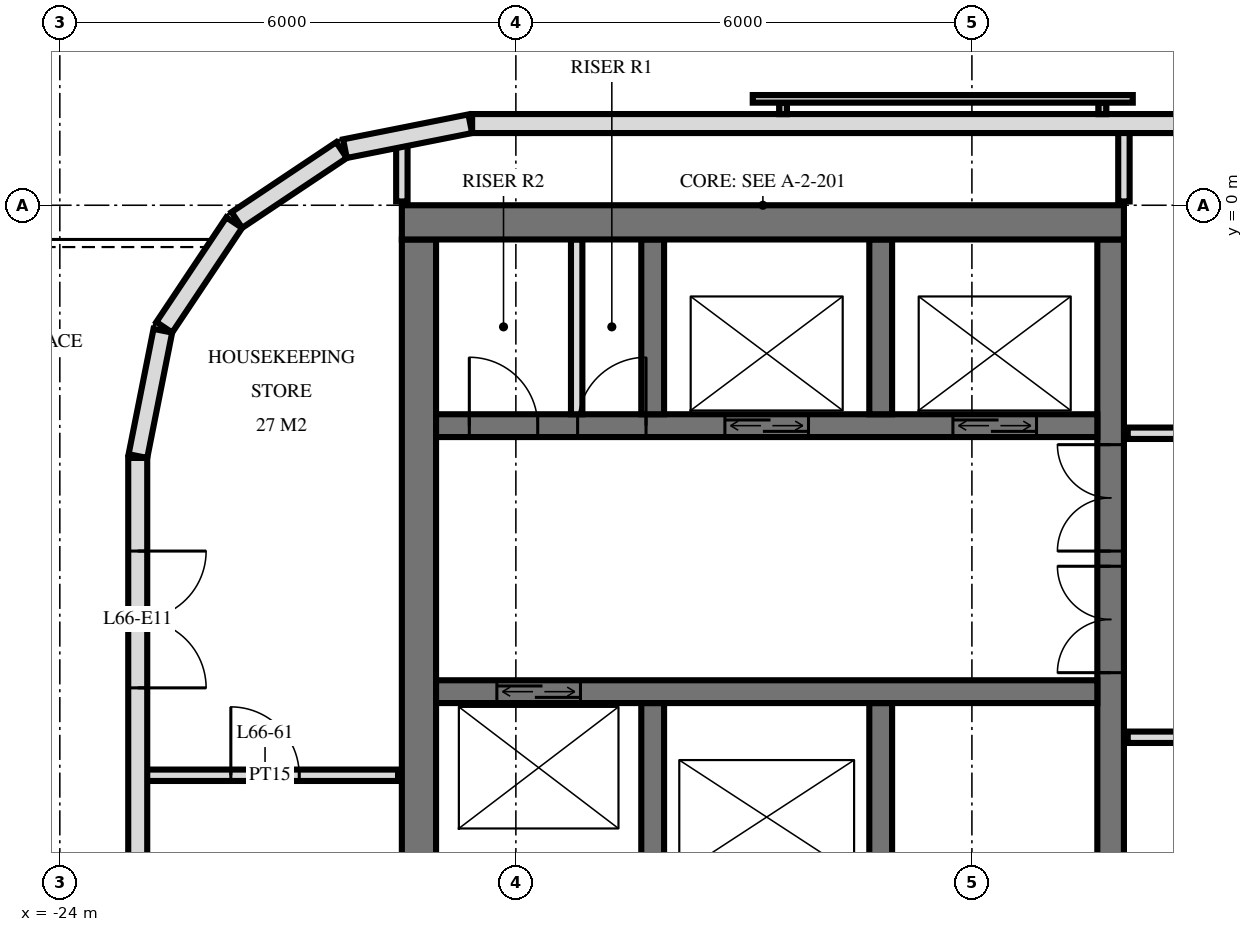
"""IFC4 building model, lengths in metres.
Left out: names, types, materials, properties, quantities, classifications, styles, units other than length and angle.
Written with IfcOpenShell. Run it as: python <this file> out.ifc"""

import sys

from ifc_helpers import new_model, si_unit, direction, frame, frame_2d, origin, place, context, subcontext, project, spatial, rectangle, extrude, element, fill, save


model = new_model("IFC4")
c1 = context("Model", 3, precision=1e-05, world=origin(), true_north=direction((0.0, 1.0)))
c2 = subcontext(c1, "Body", "Model", "MODEL_VIEW")
j1 = project(units=[si_unit("LENGTHUNIT", "METRE"), si_unit("PLANEANGLEUNIT", "RADIAN")], contexts=[c1])
p1 = place(None, origin())
s1 = spatial("IfcSite", under=j1, at=p1, CompositionType="ELEMENT")
p2 = place(p1, origin())
s2 = spatial("IfcBuilding", under=s1, at=p2, CompositionType="ELEMENT")
p3 = place(p2, frame((0.0, 0.0, 252.6)))
s3 = spatial("IfcBuildingStorey", under=s2, at=p3, CompositionType="ELEMENT", Elevation=252.6)
p4 = place(p3, frame((-19.5, -0.225, 0.0), z_axis=(0.0, 0.0, 1.0), x_axis=(1.0, 0.0, 0.0)))
e1 = element("IfcWall", 1, at=p4, inside=s3, PredefinedType="SHEAR", context=c2, shape_type="SweptSolid", body=[
    extrude(rectangle(XDim=9.5, YDim=0.45, at=frame_2d((4.75, 0.0))), origin(), (0.0, 0.0, 1.0), 3.5),
])
p5 = place(p3, frame((-10.175, -14.55, 0.0), z_axis=(0.0, 0.0, 1.0), x_axis=(0.0, 1.0, 0.0)))
e2 = element("IfcWall", 2, at=p5, inside=s3, PredefinedType="SHEAR", context=c2, shape_type="SweptSolid", body=[
    extrude(rectangle(XDim=14.1, YDim=0.35, at=frame_2d((7.05, 0.0))), origin(), (0.0, 0.0, 1.0), 3.5),
])
p6 = place(p5, frame((8.4, 0.0, 0.0)))
e3 = element("IfcOpeningElement", 3, at=p6, cuts=e2, PredefinedType="OPENING", context=c2, shape_type="SweptSolid", body=[
    extrude(rectangle(XDim=1.4, YDim=2.4, at=frame_2d((0.7, 1.2))), frame((0.0, 0.185, 0.0), z_axis=(0.0, -1.0, 0.0), x_axis=(1.0, 0.0, 0.0)), (0.0, 0.0, 1.0), 0.37),
])
p7 = place(p5, frame((10.0, 0.0, 0.0)))
e4 = element("IfcOpeningElement", 4, at=p7, cuts=e2, PredefinedType="OPENING", context=c2, shape_type="SweptSolid", body=[
    extrude(rectangle(XDim=1.4, YDim=2.4, at=frame_2d((0.7, 1.2))), frame((0.0, 0.185, 0.0), z_axis=(0.0, -1.0, 0.0), x_axis=(1.0, 0.0, 0.0)), (0.0, 0.0, 1.0), 0.37),
])
p8 = place(p5, frame((4.0, 0.0, 0.0)))
e5 = element("IfcOpeningElement", 5, at=p8, cuts=e2, PredefinedType="OPENING", context=c2, shape_type="SweptSolid", body=[
    extrude(rectangle(XDim=1.2, YDim=2.1, at=frame_2d((0.6, 1.05))), frame((0.0, 0.185, 0.0), z_axis=(0.0, -1.0, 0.0), x_axis=(1.0, 0.0, 0.0)), (0.0, 0.0, 1.0), 0.37),
])
p9 = place(p3, frame((-19.275, -14.55, 0.0), z_axis=(0.0, 0.0, 1.0), x_axis=(0.0, 1.0, 0.0)))
e6 = element("IfcWall", 6, at=p9, inside=s3, PredefinedType="SHEAR", context=c2, shape_type="SweptSolid", body=[
    extrude(rectangle(XDim=14.1, YDim=0.45, at=frame_2d((7.05, 0.0))), origin(), (0.0, 0.0, 1.0), 3.5),
])
p10 = place(p3, frame((-19.05, -2.9, 0.0), z_axis=(0.0, 0.0, 1.0), x_axis=(1.0, 0.0, 0.0)))
e7 = element("IfcWall", 7, at=p10, inside=s3, PredefinedType="SHEAR", context=c2, shape_type="SweptSolid", body=[
    extrude(rectangle(XDim=8.7, YDim=0.3, at=frame_2d((4.35, 0.0))), origin(), (0.0, 0.0, 1.0), 3.5),
])
p11 = place(p10, frame((6.8, 0.0, 0.0)))
e8 = element("IfcOpeningElement", 8, at=p11, cuts=e7, PredefinedType="OPENING", context=c2, shape_type="SweptSolid", body=[
    extrude(rectangle(XDim=1.1, YDim=2.1, at=frame_2d((0.55, 1.05))), frame((0.0, 0.16, 0.0), z_axis=(0.0, -1.0, 0.0), x_axis=(1.0, 0.0, 0.0)), (0.0, 0.0, 1.0), 0.32),
])
p12 = place(p10, frame((3.8, 0.0, 0.0)))
e9 = element("IfcOpeningElement", 9, at=p12, cuts=e7, PredefinedType="OPENING", context=c2, shape_type="SweptSolid", body=[
    extrude(rectangle(XDim=1.1, YDim=2.1, at=frame_2d((0.55, 1.05))), frame((0.0, 0.16, 0.0), z_axis=(0.0, -1.0, 0.0), x_axis=(1.0, 0.0, 0.0)), (0.0, 0.0, 1.0), 0.32),
])
p13 = place(p10, frame((1.863, 0.0, 0.0)))
e10 = element("IfcOpeningElement", 10, at=p13, cuts=e7, PredefinedType="OPENING", context=c2, shape_type="SweptSolid", body=[
    extrude(rectangle(XDim=0.9, YDim=2.1, at=frame_2d((0.45, 1.05))), frame((0.0, 0.16, 0.0), z_axis=(0.0, -1.0, 0.0), x_axis=(1.0, 0.0, 0.0)), (0.0, 0.0, 1.0), 0.32),
])
p14 = place(p10, frame((0.438, 0.0, 0.0)))
e11 = element("IfcOpeningElement", 11, at=p14, cuts=e7, PredefinedType="OPENING", context=c2, shape_type="SweptSolid", body=[
    extrude(rectangle(XDim=0.9, YDim=2.1, at=frame_2d((0.45, 1.05))), frame((0.0, 0.16, 0.0), z_axis=(0.0, -1.0, 0.0), x_axis=(1.0, 0.0, 0.0)), (0.0, 0.0, 1.0), 0.32),
])
p15 = place(p3, frame((-19.05, -6.4, 0.0), z_axis=(0.0, 0.0, 1.0), x_axis=(1.0, 0.0, 0.0)))
e12 = element("IfcWall", 12, at=p15, inside=s3, PredefinedType="SHEAR", context=c2, shape_type="SweptSolid", body=[
    extrude(rectangle(XDim=8.7, YDim=0.3, at=frame_2d((4.35, 0.0))), origin(), (0.0, 0.0, 1.0), 3.5),
])
p16 = place(p15, frame((0.8, 0.0, 0.0)))
e13 = element("IfcOpeningElement", 13, at=p16, cuts=e12, PredefinedType="OPENING", context=c2, shape_type="SweptSolid", body=[
    extrude(rectangle(XDim=1.1, YDim=2.1, at=frame_2d((0.55, 1.05))), frame((0.0, 0.16, 0.0), z_axis=(0.0, -1.0, 0.0), x_axis=(1.0, 0.0, 0.0)), (0.0, 0.0, 1.0), 0.32),
])
for number, where, z_axis, x_axis in (
    (14, (-13.2, -2.75, 0.0), (0.0, 0.0, 1.0), (0.0, 1.0, 0.0)),
    (15, (-13.2, -8.85, 0.0), (0.0, 0.0, 1.0), (0.0, 1.0, 0.0)),
    (16, (-16.2, -2.75, 0.0), (0.0, 0.0, 1.0), (0.0, 1.0, 0.0)),
    (17, (-16.2, -8.85, 0.0), (0.0, 0.0, 1.0), (0.0, 1.0, 0.0)),
):
    element("IfcWall", number, at=place(p3, frame(where, z_axis=z_axis, x_axis=x_axis)), inside=s3, PredefinedType="SHEAR", context=c2, shape_type="SweptSolid", body=[
        extrude(rectangle(XDim=2.3, YDim=0.3, at=frame_2d((1.15, 0.0))), origin(), (0.0, 0.0, 1.0), 3.5),
    ])
p17 = place(p3, frame((18.575, 1.075, 0.0), z_axis=(0.0, 0.0, 1.0), x_axis=(-1.0, 0.0, 0.0)))
e18 = element("IfcWall", 18, at=p17, inside=s3, PredefinedType="SOLIDWALL", context=c2, shape_type="SweptSolid", body=[
    extrude(rectangle(XDim=37.151, YDim=0.25, at=frame_2d((18.575, 0.0))), origin(), (0.0, 0.0, 1.0), 3.22),
])
p18 = place(p17, frame((9.275, 0.0, 0.9)))
e19 = element("IfcOpeningElement", 19, at=p18, cuts=e18, PredefinedType="OPENING", context=c2, shape_type="SweptSolid", body=[
    extrude(rectangle(XDim=2.4, YDim=1.5, at=frame_2d((1.2, 0.75))), frame((0.0, 0.135, 0.0), z_axis=(0.0, -1.0, 0.0), x_axis=(1.0, 0.0, 0.0)), (0.0, 0.0, 1.0), 0.27),
])
p19 = place(p17, frame((12.275, 0.0, 0.9)))
e20 = element("IfcOpeningElement", 20, at=p19, cuts=e18, PredefinedType="OPENING", context=c2, shape_type="SweptSolid", body=[
    extrude(rectangle(XDim=2.4, YDim=1.5, at=frame_2d((1.2, 0.75))), frame((0.0, 0.135, 0.0), z_axis=(0.0, -1.0, 0.0), x_axis=(1.0, 0.0, 0.0)), (0.0, 0.0, 1.0), 0.27),
])
p20 = place(p17, frame((18.275, 0.0, 0.9)))
e21 = element("IfcOpeningElement", 21, at=p20, cuts=e18, PredefinedType="OPENING", context=c2, shape_type="SweptSolid", body=[
    extrude(rectangle(XDim=2.4, YDim=1.5, at=frame_2d((1.2, 0.75))), frame((0.0, 0.135, 0.0), z_axis=(0.0, -1.0, 0.0), x_axis=(1.0, 0.0, 0.0)), (0.0, 0.0, 1.0), 0.27),
])
p21 = place(p3, frame((-18.6, 1.073, 0.0), z_axis=(0.0, 0.0, 1.0), x_axis=(-0.980797896849, -0.195026884138, 0.0)))
e22 = element("IfcWall", 22, at=p21, inside=s3, PredefinedType="SOLIDWALL", context=c2, shape_type="SweptSolid", body=[
    extrude(rectangle(XDim=1.681, YDim=0.25, at=frame_2d((0.841, 0.0))), origin(), (0.0, 0.0, 1.0), 3.22),
])
for number, where, z_axis, x_axis in (
    (23, (-20.294, 0.726, 0.0), (0.0, 0.0, 1.0), (-0.831, -0.556, 0.0)),
    (24, (-21.706, -0.229, 0.0), (0.0, 0.0, 1.0), (-0.556, -0.831, 0.0)),
):
    element("IfcWall", number, at=place(p3, frame(where, z_axis=z_axis, x_axis=x_axis)), inside=s3, PredefinedType="SOLIDWALL", context=c2, shape_type="SweptSolid", body=[
        extrude(rectangle(XDim=1.656, YDim=0.25, at=frame_2d((0.828, 0.0))), origin(), (0.0, 0.0, 1.0), 3.22),
    ])
p22 = place(p3, frame((-22.645, -1.651, 0.0), z_axis=(0.0, 0.0, 1.0), x_axis=(-0.19513878023, -0.980775640221, 0.0)))
e25 = element("IfcWall", 25, at=p22, inside=s3, PredefinedType="SOLIDWALL", context=c2, shape_type="SweptSolid", body=[
    extrude(rectangle(XDim=1.681, YDim=0.25, at=frame_2d((0.841, 0.0))), origin(), (0.0, 0.0, 1.0), 3.22),
])
p23 = place(p3, frame((-22.975, -3.325, 0.0), z_axis=(0.0, 0.0, 1.0), x_axis=(0.0, -1.0, 0.0)))
e26 = element("IfcWall", 26, at=p23, inside=s3, PredefinedType="SOLIDWALL", context=c2, shape_type="SweptSolid", body=[
    extrude(rectangle(XDim=25.951, YDim=0.25, at=frame_2d((12.975, 0.0))), origin(), (0.0, 0.0, 1.0), 3.22),
])
p24 = place(p23, frame((1.225, 0.0, 0.0)))
e27 = element("IfcOpeningElement", 27, at=p24, cuts=e26, PredefinedType="OPENING", context=c2, shape_type="SweptSolid", body=[
    extrude(rectangle(XDim=1.8, YDim=2.4, at=frame_2d((0.9, 1.2))), frame((0.0, 0.135, 0.0), z_axis=(0.0, -1.0, 0.0), x_axis=(1.0, 0.0, 0.0)), (0.0, 0.0, 1.0), 0.27),
])
p25 = place(p23, frame((7.975, 0.0, 0.0)))
e28 = element("IfcOpeningElement", 28, at=p25, cuts=e26, PredefinedType="OPENING", context=c2, shape_type="SweptSolid", body=[
    extrude(rectangle(XDim=1.8, YDim=2.4, at=frame_2d((0.9, 1.2))), frame((0.0, 0.135, 0.0), z_axis=(0.0, -1.0, 0.0), x_axis=(1.0, 0.0, 0.0)), (0.0, 0.0, 1.0), 0.27),
])
p26 = place(p23, frame((18.175, 0.0, 0.0)))
e29 = element("IfcOpeningElement", 29, at=p26, cuts=e26, PredefinedType="OPENING", context=c2, shape_type="SweptSolid", body=[
    extrude(rectangle(XDim=1.8, YDim=2.4, at=frame_2d((0.9, 1.2))), frame((0.0, 0.135, 0.0), z_axis=(0.0, -1.0, 0.0), x_axis=(1.0, 0.0, 0.0)), (0.0, 0.0, 1.0), 0.27),
])
p27 = place(p23, frame((21.075, 0.0, 0.0)))
e30 = element("IfcOpeningElement", 30, at=p27, cuts=e26, PredefinedType="OPENING", context=c2, shape_type="SweptSolid", body=[
    extrude(rectangle(XDim=1.8, YDim=2.4, at=frame_2d((0.9, 1.2))), frame((0.0, 0.135, 0.0), z_axis=(0.0, -1.0, 0.0), x_axis=(1.0, 0.0, 0.0)), (0.0, 0.0, 1.0), 0.27),
])
p28 = place(p23, frame((23.825, 0.0, 0.9)))
e31 = element("IfcOpeningElement", 31, at=p28, cuts=e26, PredefinedType="OPENING", context=c2, shape_type="SweptSolid", body=[
    extrude(rectangle(XDim=1.8, YDim=1.5, at=frame_2d((0.9, 0.75))), frame((0.0, 0.135, 0.0), z_axis=(0.0, -1.0, 0.0), x_axis=(1.0, 0.0, 0.0)), (0.0, 0.0, 1.0), 0.27),
])
p29 = place(p3, frame((-17.2, -2.75, 0.0), z_axis=(0.0, 0.0, 1.0), x_axis=(0.0, 1.0, 0.0)))
e32 = element("IfcWall", 32, at=p29, inside=s3, PredefinedType="PARTITIONING", context=c2, shape_type="SweptSolid", body=[
    extrude(rectangle(XDim=2.3, YDim=0.15, at=frame_2d((1.15, 0.0))), origin(), (0.0, 0.0, 1.0), 3.2),
])
p30 = place(p3, frame((-10.0, 0.05, 0.0), z_axis=(0.0, 0.0, 1.0), x_axis=(0.0, 1.0, 0.0)))
e33 = element("IfcWall", 33, at=p30, inside=s3, PredefinedType="PLUMBINGWALL", context=c2, shape_type="SweptSolid", body=[
    extrude(rectangle(XDim=0.97, YDim=0.15, at=frame_2d((0.485, 0.0))), origin(), (0.0, 0.0, 1.0), 3.22),
])
p31 = place(p3, frame((-19.5, 0.05, 0.0), z_axis=(0.0, 0.0, 1.0), x_axis=(0.0, 1.0, 0.0)))
e34 = element("IfcWall", 34, at=p31, inside=s3, PredefinedType="PARTITIONING", context=c2, shape_type="SweptSolid", body=[
    extrude(rectangle(XDim=0.787, YDim=0.15, at=frame_2d((0.394, 0.0))), origin(), (0.0, 0.0, 1.0), 3.22),
])
p32 = place(p3, frame((-22.92, -7.5, 0.0), z_axis=(0.0, 0.0, 1.0), x_axis=(1.0, 0.0, 0.0)))
e35 = element("IfcWall", 35, at=p32, inside=s3, PredefinedType="PARTITIONING", context=c2, shape_type="SweptSolid", body=[
    extrude(rectangle(XDim=3.37, YDim=0.15, at=frame_2d((1.685, 0.0))), origin(), (0.0, 0.0, 1.0), 3.22),
])
p33 = place(p32, frame((1.17, 0.0, 0.0)))
e36 = element("IfcOpeningElement", 36, at=p33, cuts=e35, PredefinedType="OPENING", context=c2, shape_type="SweptSolid", body=[
    extrude(rectangle(XDim=0.9, YDim=2.1, at=frame_2d((0.45, 1.05))), frame((0.0, 0.085, 0.0), z_axis=(0.0, -1.0, 0.0), x_axis=(1.0, 0.0, 0.0)), (0.0, 0.0, 1.0), 0.17),
])
p34 = place(p3, frame((-9.95, -7.0, 0.0), z_axis=(0.0, 0.0, 1.0), x_axis=(1.0, 0.0, 0.0)))
e37 = element("IfcWall", 37, at=p34, inside=s3, PredefinedType="PARTITIONING", context=c2, shape_type="SweptSolid", body=[
    extrude(rectangle(XDim=19.9, YDim=0.15, at=frame_2d((9.95, 0.0))), origin(), (0.0, 0.0, 1.0), 3.22),
])
p35 = place(p34, frame((9.45, 0.0, 0.0)))
e38 = element("IfcOpeningElement", 38, at=p35, cuts=e37, PredefinedType="OPENING", context=c2, shape_type="SweptSolid", body=[
    extrude(rectangle(XDim=1.0, YDim=2.1, at=frame_2d((0.5, 1.05))), frame((0.0, 0.085, 0.0), z_axis=(0.0, -1.0, 0.0), x_axis=(1.0, 0.0, 0.0)), (0.0, 0.0, 1.0), 0.17),
])
p36 = place(p34, frame((3.45, 0.0, 0.0)))
e39 = element("IfcOpeningElement", 39, at=p36, cuts=e37, PredefinedType="OPENING", context=c2, shape_type="SweptSolid", body=[
    extrude(rectangle(XDim=1.0, YDim=2.1, at=frame_2d((0.5, 1.05))), frame((0.0, 0.085, 0.0), z_axis=(0.0, -1.0, 0.0), x_axis=(1.0, 0.0, 0.0)), (0.0, 0.0, 1.0), 0.17),
])
p37 = place(p3, frame((-9.95, -3.0, 0.0), z_axis=(0.0, 0.0, 1.0), x_axis=(1.0, 0.0, 0.0)))
e40 = element("IfcWall", 40, at=p37, inside=s3, PredefinedType="PARTITIONING", context=c2, shape_type="SweptSolid", body=[
    extrude(rectangle(XDim=19.9, YDim=0.15, at=frame_2d((9.95, 0.0))), origin(), (0.0, 0.0, 1.0), 3.22),
])
p38 = place(p37, frame((0.95, 0.0, 0.0)))
e41 = element("IfcOpeningElement", 41, at=p38, cuts=e40, PredefinedType="OPENING", context=c2, shape_type="SweptSolid", body=[
    extrude(rectangle(XDim=1.0, YDim=2.1, at=frame_2d((0.5, 1.05))), frame((0.0, 0.085, 0.0), z_axis=(0.0, -1.0, 0.0), x_axis=(1.0, 0.0, 0.0)), (0.0, 0.0, 1.0), 0.17),
])
p39 = place(p37, frame((3.7, 0.0, 0.0)))
e42 = element("IfcOpeningElement", 42, at=p39, cuts=e40, PredefinedType="OPENING", context=c2, shape_type="SweptSolid", body=[
    extrude(rectangle(XDim=1.0, YDim=2.1, at=frame_2d((0.5, 1.05))), frame((0.0, 0.085, 0.0), z_axis=(0.0, -1.0, 0.0), x_axis=(1.0, 0.0, 0.0)), (0.0, 0.0, 1.0), 0.17),
])
p40 = place(p37, frame((8.45, 0.0, 0.0)))
e43 = element("IfcOpeningElement", 43, at=p40, cuts=e40, PredefinedType="OPENING", context=c2, shape_type="SweptSolid", body=[
    extrude(rectangle(XDim=1.0, YDim=2.1, at=frame_2d((0.5, 1.05))), frame((0.0, 0.085, 0.0), z_axis=(0.0, -1.0, 0.0), x_axis=(1.0, 0.0, 0.0)), (0.0, 0.0, 1.0), 0.17),
])
p41 = place(p37, frame((15.7, 0.0, 0.0)))
e44 = element("IfcOpeningElement", 44, at=p41, cuts=e40, PredefinedType="OPENING", context=c2, shape_type="SweptSolid", body=[
    extrude(rectangle(XDim=1.0, YDim=2.1, at=frame_2d((0.5, 1.05))), frame((0.0, 0.085, 0.0), z_axis=(0.0, -1.0, 0.0), x_axis=(1.0, 0.0, 0.0)), (0.0, 0.0, 1.0), 0.17),
])
p42 = place(p24, origin())
e45 = element("IfcDoor", 45, at=p42, inside=s3, OperationType="DOUBLE_DOOR_SINGLE_SWING", PredefinedType="DOOR", context=c2, shape_type="SweptSolid", body=[
    extrude(rectangle(XDim=1.8, YDim=2.4, at=frame_2d((0.9, 1.2))), frame((0.0, 0.025, 0.0), z_axis=(0.0, -1.0, 0.0), x_axis=(1.0, 0.0, 0.0)), (0.0, 0.0, 1.0), 0.05),
])
fill(e27, e45)
p43 = place(p11, origin())
e46 = element("IfcDoor", 46, at=p43, inside=s3, OperationType="DOUBLE_DOOR_SLIDING", PredefinedType="USERDEFINED", context=c2, shape_type="SweptSolid", body=[
    extrude(rectangle(XDim=1.1, YDim=2.1, at=frame_2d((0.55, 1.05))), frame((0.0, 0.025, 0.0), z_axis=(0.0, -1.0, 0.0), x_axis=(1.0, 0.0, 0.0)), (0.0, 0.0, 1.0), 0.05),
])
fill(e8, e46)
p44 = place(p12, origin())
e47 = element("IfcDoor", 47, at=p44, inside=s3, OperationType="DOUBLE_DOOR_SLIDING", PredefinedType="USERDEFINED", context=c2, shape_type="SweptSolid", body=[
    extrude(rectangle(XDim=1.1, YDim=2.1, at=frame_2d((0.55, 1.05))), frame((0.0, 0.025, 0.0), z_axis=(0.0, -1.0, 0.0), x_axis=(1.0, 0.0, 0.0)), (0.0, 0.0, 1.0), 0.05),
])
fill(e9, e47)
p45 = place(p16, origin())
e48 = element("IfcDoor", 48, at=p45, inside=s3, OperationType="DOUBLE_DOOR_SLIDING", PredefinedType="USERDEFINED", context=c2, shape_type="SweptSolid", body=[
    extrude(rectangle(XDim=1.1, YDim=2.1, at=frame_2d((0.55, 1.05))), frame((0.0, 0.025, 0.0), z_axis=(0.0, -1.0, 0.0), x_axis=(1.0, 0.0, 0.0)), (0.0, 0.0, 1.0), 0.05),
])
fill(e13, e48)
p46 = place(p6, origin())
e49 = element("IfcDoor", 49, at=p46, inside=s3, OperationType="DOUBLE_DOOR_SINGLE_SWING", PredefinedType="DOOR", context=c2, shape_type="SweptSolid", body=[
    extrude(rectangle(XDim=1.4, YDim=2.4, at=frame_2d((0.7, 1.2))), frame((0.0, 0.025, 0.0), z_axis=(0.0, -1.0, 0.0), x_axis=(1.0, 0.0, 0.0)), (0.0, 0.0, 1.0), 0.05),
])
fill(e3, e49)
p47 = place(p7, origin())
e50 = element("IfcDoor", 50, at=p47, inside=s3, OperationType="DOUBLE_DOOR_SINGLE_SWING", PredefinedType="DOOR", context=c2, shape_type="SweptSolid", body=[
    extrude(rectangle(XDim=1.4, YDim=2.4, at=frame_2d((0.7, 1.2))), frame((0.0, 0.025, 0.0), z_axis=(0.0, -1.0, 0.0), x_axis=(1.0, 0.0, 0.0)), (0.0, 0.0, 1.0), 0.05),
])
fill(e4, e50)
p48 = place(p13, origin())
e51 = element("IfcDoor", 51, at=p48, inside=s3, OperationType="SINGLE_SWING_LEFT", PredefinedType="DOOR", context=c2, shape_type="SweptSolid", body=[
    extrude(rectangle(XDim=0.9, YDim=2.1, at=frame_2d((0.45, 1.05))), frame((0.0, 0.025, 0.0), z_axis=(0.0, -1.0, 0.0), x_axis=(1.0, 0.0, 0.0)), (0.0, 0.0, 1.0), 0.05),
])
fill(e10, e51)
p49 = place(p14, origin())
e52 = element("IfcDoor", 52, at=p49, inside=s3, OperationType="SINGLE_SWING_RIGHT", PredefinedType="DOOR", context=c2, shape_type="SweptSolid", body=[
    extrude(rectangle(XDim=0.9, YDim=2.1, at=frame_2d((0.45, 1.05))), frame((0.0, 0.025, 0.0), z_axis=(0.0, -1.0, 0.0), x_axis=(1.0, 0.0, 0.0)), (0.0, 0.0, 1.0), 0.05),
])
fill(e11, e52)
p50 = place(p33, origin())
e53 = element("IfcDoor", 53, at=p50, inside=s3, OperationType="SINGLE_SWING_RIGHT", PredefinedType="DOOR", context=c2, shape_type="SweptSolid", body=[
    extrude(rectangle(XDim=0.9, YDim=2.1, at=frame_2d((0.45, 1.05))), frame((0.0, 0.025, 0.0), z_axis=(0.0, -1.0, 0.0), x_axis=(1.0, 0.0, 0.0)), (0.0, 0.0, 1.0), 0.05),
])
fill(e36, e53)
save(model, sys.argv[1])
